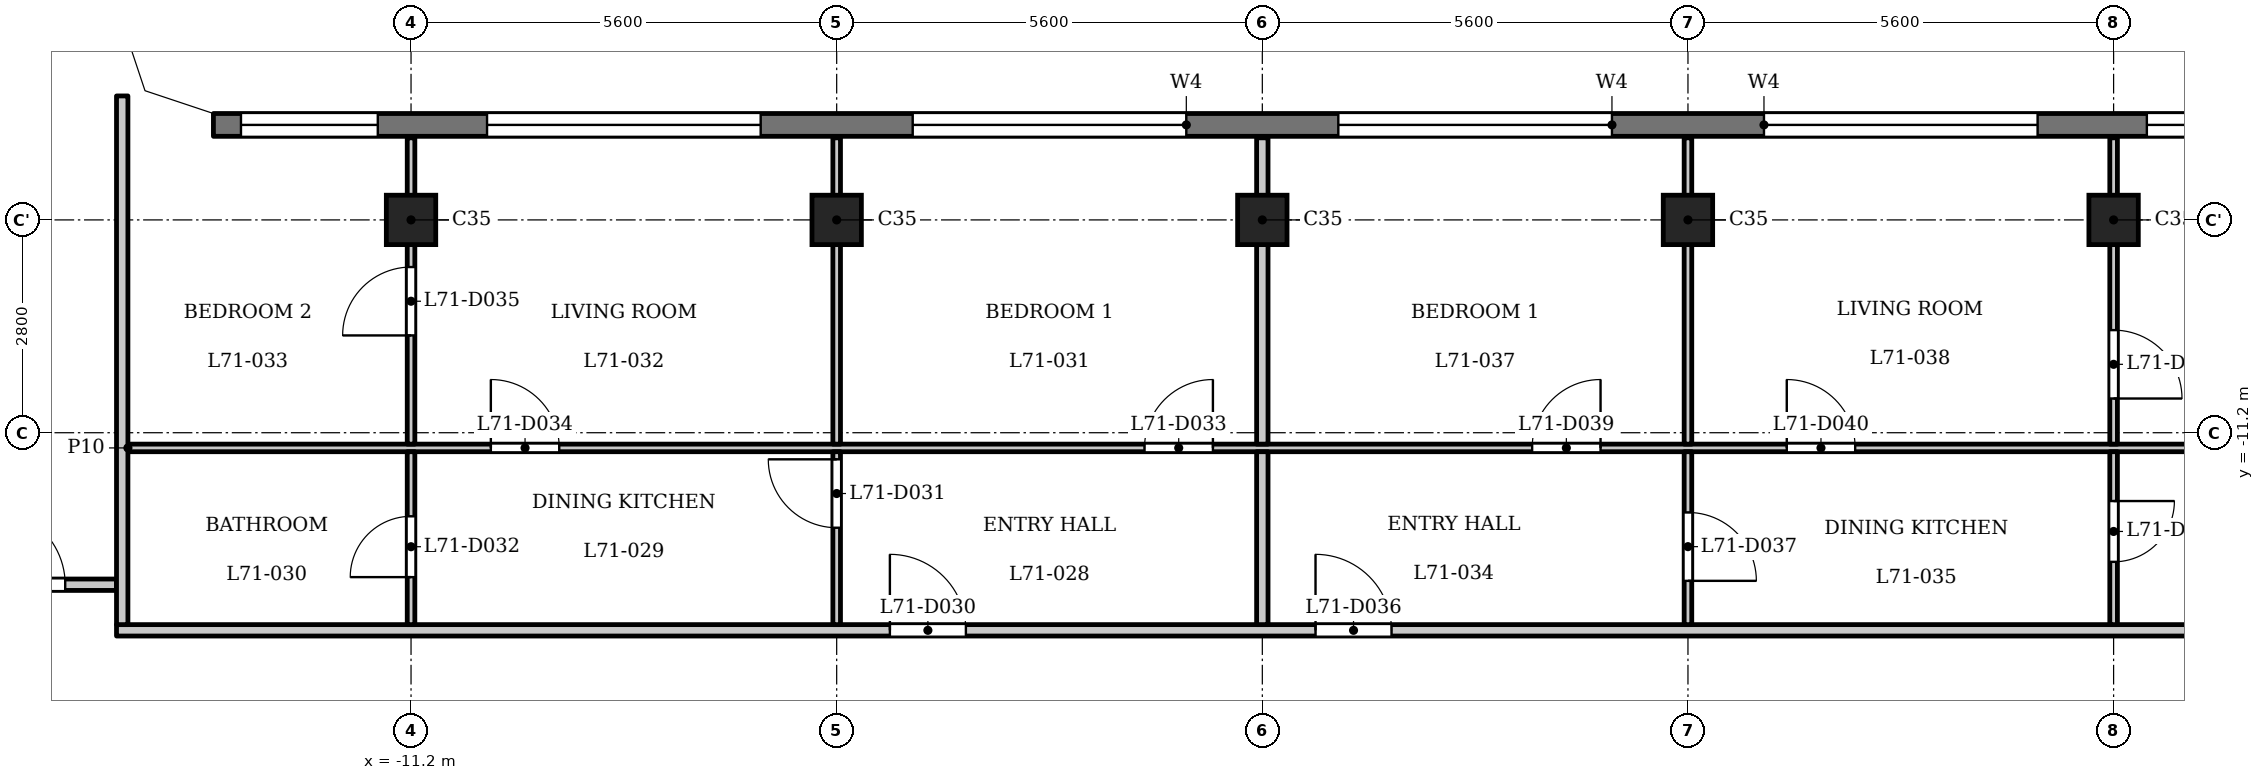
"""IFC4 building model, lengths in metres.
Left out: names, types, materials, properties, quantities, classifications, styles, units other than length and angle.
Written with IfcOpenShell. Run it as: python <this file> out.ifc"""

import sys

from ifc_helpers import new_model, si_unit, direction, frame, frame_2d, origin, origin_2d, place, context, subcontext, project, spatial, polyline, rectangle, outline, extrude, element, fill, save


model = new_model("IFC4")
c1 = context("Model", 3, precision=1e-05, world=origin(), true_north=direction((0.0, 1.0)))
c2 = subcontext(c1, "Body", "Model", "MODEL_VIEW")
j1 = project(units=[si_unit("LENGTHUNIT", "METRE"), si_unit("PLANEANGLEUNIT", "RADIAN")], contexts=[c1])
p1 = place(None, origin())
s1 = spatial("IfcSite", under=j1, at=p1, CompositionType="ELEMENT")
p2 = place(p1, origin())
s2 = spatial("IfcBuilding", under=s1, at=p2, CompositionType="ELEMENT")
p3 = place(p2, frame((0.0, 0.0, 273.2)))
s3 = spatial("IfcBuildingStorey", under=s2, at=p3, CompositionType="ELEMENT", Elevation=273.2)
for number, where, z_axis, x_axis in (
    (1, (-11.2, -8.4, 0.0), (0.0, 0.0, 1.0), (1.0, 0.0, 0.0)),
    (2, (-5.6, -8.4, 0.0), (0.0, 0.0, 1.0), (1.0, 0.0, 0.0)),
    (3, (0.0, -8.4, 0.0), (0.0, 0.0, 1.0), (1.0, 0.0, 0.0)),
    (4, (5.6, -8.4, 0.0), (0.0, 0.0, 1.0), (1.0, 0.0, 0.0)),
    (5, (11.2, -8.4, 0.0), (0.0, 0.0, 1.0), (1.0, 0.0, 0.0)),
):
    element("IfcColumn", number, at=place(p3, frame(where, z_axis=z_axis, x_axis=x_axis)), inside=s3, PredefinedType="COLUMN", context=c2, shape_type="SweptSolid", body=[
        extrude(rectangle(XDim=0.65, YDim=0.65, at=origin_2d()), origin(), (0.0, 0.0, 1.0), 3.5),
    ])
p4 = place(p3, frame((13.8, -7.15, 0.0), z_axis=(0.0, 0.0, 1.0), x_axis=(-1.0, 0.0, 0.0)))
e6 = element("IfcWall", 6, at=p4, inside=s3, PredefinedType="SOLIDWALL", context=c2, shape_type="SweptSolid", body=[
    extrude(rectangle(XDim=27.6, YDim=0.3, at=frame_2d((13.8, 0.0))), origin(), (0.0, 0.0, 1.0), 3.2),
])
p5 = place(p4, frame((0.363, 0.0, 0.9)))
e7 = element("IfcOpeningElement", 7, at=p5, cuts=e6, PredefinedType="OPENING", context=c2, shape_type="SweptSolid", body=[
    extrude(rectangle(XDim=1.8, YDim=1.25, at=frame_2d((0.9, 0.625))), frame((0.0, 0.16, 0.0), z_axis=(0.0, -1.0, 0.0), x_axis=(1.0, 0.0, 0.0)), (0.0, 0.0, 1.0), 0.32),
])
p6 = place(p4, frame((3.6, 0.0, 1.2)))
e8 = element("IfcOpeningElement", 8, at=p6, cuts=e6, PredefinedType="OPENING", context=c2, shape_type="SweptSolid", body=[
    extrude(rectangle(XDim=3.6, YDim=0.95, at=frame_2d((1.8, 0.475))), frame((0.0, 0.16, 0.0), z_axis=(0.0, -1.0, 0.0), x_axis=(1.0, 0.0, 0.0)), (0.0, 0.0, 1.0), 0.32),
])
p7 = place(p4, frame((9.2, 0.0, 1.2)))
e9 = element("IfcOpeningElement", 9, at=p7, cuts=e6, PredefinedType="OPENING", context=c2, shape_type="SweptSolid", body=[
    extrude(rectangle(XDim=3.6, YDim=0.95, at=frame_2d((1.8, 0.475))), frame((0.0, 0.16, 0.0), z_axis=(0.0, -1.0, 0.0), x_axis=(1.0, 0.0, 0.0)), (0.0, 0.0, 1.0), 0.32),
])
p8 = place(p4, frame((14.8, 0.0, 1.2)))
e10 = element("IfcOpeningElement", 10, at=p8, cuts=e6, PredefinedType="OPENING", context=c2, shape_type="SweptSolid", body=[
    extrude(rectangle(XDim=3.6, YDim=0.95, at=frame_2d((1.8, 0.475))), frame((0.0, 0.16, 0.0), z_axis=(0.0, -1.0, 0.0), x_axis=(1.0, 0.0, 0.0)), (0.0, 0.0, 1.0), 0.32),
])
p9 = place(p4, frame((20.4, 0.0, 1.2)))
e11 = element("IfcOpeningElement", 11, at=p9, cuts=e6, PredefinedType="OPENING", context=c2, shape_type="SweptSolid", body=[
    extrude(rectangle(XDim=3.6, YDim=0.95, at=frame_2d((1.8, 0.475))), frame((0.0, 0.16, 0.0), z_axis=(0.0, -1.0, 0.0), x_axis=(1.0, 0.0, 0.0)), (0.0, 0.0, 1.0), 0.32),
])
p10 = place(p4, frame((25.438, 0.0, 0.9)))
e12 = element("IfcOpeningElement", 12, at=p10, cuts=e6, PredefinedType="OPENING", context=c2, shape_type="SweptSolid", body=[
    extrude(rectangle(XDim=1.8, YDim=1.25, at=frame_2d((0.9, 0.625))), frame((0.0, 0.16, 0.0), z_axis=(0.0, -1.0, 0.0), x_axis=(1.0, 0.0, 0.0)), (0.0, 0.0, 1.0), 0.32),
])
p11 = place(p3, frame((-15.075, -13.8, 0.0), z_axis=(0.0, 0.0, 1.0), x_axis=(1.0, 0.0, 0.0)))
e13 = element("IfcWall", 13, at=p11, inside=s3, PredefinedType="PARTITIONING", context=c2, shape_type="SweptSolid", body=[
    extrude(rectangle(XDim=30.15, YDim=0.15, at=frame_2d((15.075, 0.0))), origin(), (0.0, 0.0, 1.0), 3.2),
])
p12 = place(p11, frame((10.175, 0.0, 0.0)))
e14 = element("IfcOpeningElement", 14, at=p12, cuts=e13, PredefinedType="OPENING", context=c2, shape_type="SweptSolid", body=[
    extrude(rectangle(XDim=1.0, YDim=2.1, at=frame_2d((0.5, 1.05))), frame((0.0, 0.085, 0.0), z_axis=(0.0, -1.0, 0.0), x_axis=(1.0, 0.0, 0.0)), (0.0, 0.0, 1.0), 0.17),
])
p13 = place(p11, frame((15.775, 0.0, 0.0)))
e15 = element("IfcOpeningElement", 15, at=p13, cuts=e13, PredefinedType="OPENING", context=c2, shape_type="SweptSolid", body=[
    extrude(rectangle(XDim=1.0, YDim=2.1, at=frame_2d((0.5, 1.05))), frame((0.0, 0.085, 0.0), z_axis=(0.0, -1.0, 0.0), x_axis=(1.0, 0.0, 0.0)), (0.0, 0.0, 1.0), 0.17),
])
p14 = place(p3, frame((-17.4, -13.2, 0.0), z_axis=(0.0, 0.0, 1.0), x_axis=(1.0, 0.0, 0.0)))
e16 = element("IfcWall", 16, at=p14, inside=s3, PredefinedType="PARTITIONING", context=c2, shape_type="SweptSolid", body=[
    extrude(rectangle(XDim=2.325, YDim=0.15, at=frame_2d((1.163, 0.0))), origin(), (0.0, 0.0, 1.0), 3.2),
])
p15 = place(p14, frame((0.65, 0.0, 0.0)))
e17 = element("IfcOpeningElement", 17, at=p15, cuts=e16, PredefinedType="OPENING", context=c2, shape_type="SweptSolid", body=[
    extrude(rectangle(XDim=1.0, YDim=2.1, at=frame_2d((0.5, 1.05))), frame((0.0, 0.085, 0.0), z_axis=(0.0, -1.0, 0.0), x_axis=(1.0, 0.0, 0.0)), (0.0, 0.0, 1.0), 0.17),
])
p16 = place(p3, frame((-14.925, -11.4, 0.0), z_axis=(0.0, 0.0, 1.0), x_axis=(1.0, 0.0, 0.0)))
e18 = element("IfcWall", 18, at=p16, inside=s3, PredefinedType="PARTITIONING", context=c2, shape_type="SweptSolid", body=[
    extrude(rectangle(XDim=29.85, YDim=0.1, at=frame_2d((14.925, 0.0))), origin(), (0.0, 0.0, 1.0), 3.2),
])
p17 = place(p16, frame((13.375, 0.0, 0.0)))
e19 = element("IfcOpeningElement", 19, at=p17, cuts=e18, PredefinedType="OPENING", context=c2, shape_type="SweptSolid", body=[
    extrude(rectangle(XDim=0.9, YDim=2.1, at=frame_2d((0.45, 1.05))), frame((0.0, 0.06, 0.0), z_axis=(0.0, -1.0, 0.0), x_axis=(1.0, 0.0, 0.0)), (0.0, 0.0, 1.0), 0.12),
])
p18 = place(p16, frame((4.775, 0.0, 0.0)))
e20 = element("IfcOpeningElement", 20, at=p18, cuts=e18, PredefinedType="OPENING", context=c2, shape_type="SweptSolid", body=[
    extrude(rectangle(XDim=0.9, YDim=2.1, at=frame_2d((0.45, 1.05))), frame((0.0, 0.06, 0.0), z_axis=(0.0, -1.0, 0.0), x_axis=(1.0, 0.0, 0.0)), (0.0, 0.0, 1.0), 0.12),
])
p19 = place(p16, frame((18.475, 0.0, 0.0)))
e21 = element("IfcOpeningElement", 21, at=p19, cuts=e18, PredefinedType="OPENING", context=c2, shape_type="SweptSolid", body=[
    extrude(rectangle(XDim=0.9, YDim=2.1, at=frame_2d((0.45, 1.05))), frame((0.0, 0.06, 0.0), z_axis=(0.0, -1.0, 0.0), x_axis=(1.0, 0.0, 0.0)), (0.0, 0.0, 1.0), 0.12),
])
p20 = place(p16, frame((21.825, 0.0, 0.0)))
e22 = element("IfcOpeningElement", 22, at=p20, cuts=e18, PredefinedType="OPENING", context=c2, shape_type="SweptSolid", body=[
    extrude(rectangle(XDim=0.9, YDim=2.1, at=frame_2d((0.45, 1.05))), frame((0.0, 0.06, 0.0), z_axis=(0.0, -1.0, 0.0), x_axis=(1.0, 0.0, 0.0)), (0.0, 0.0, 1.0), 0.12),
])
p21 = place(p3, frame((-15.0, -13.725, 0.0), z_axis=(0.0, 0.0, 1.0), x_axis=(0.0, 1.0, 0.0)))
e23 = element("IfcWall", 23, at=p21, inside=s3, PredefinedType="PARTITIONING", context=c2, shape_type="SweptSolid", body=[
    extrude(rectangle(XDim=6.956, YDim=0.15, at=frame_2d((3.478, 0.0))), origin(), (0.0, 0.0, 1.0), 3.2),
])
p22 = place(p3, frame((-11.2, -13.725, 0.0), z_axis=(0.0, 0.0, 1.0), x_axis=(0.0, 1.0, 0.0)))
e24 = element("IfcWall", 24, at=p22, inside=s3, PredefinedType="PARTITIONING", context=c2, shape_type="SweptSolid", body=[
    extrude(rectangle(XDim=2.275, YDim=0.1, at=frame_2d((1.138, 0.0))), origin(), (0.0, 0.0, 1.0), 3.2),
])
p23 = place(p22, frame((0.625, 0.0, 0.0)))
e25 = element("IfcOpeningElement", 25, at=p23, cuts=e24, PredefinedType="OPENING", context=c2, shape_type="SweptSolid", body=[
    extrude(rectangle(XDim=0.8, YDim=2.1, at=frame_2d((0.4, 1.05))), frame((0.0, 0.06, 0.0), z_axis=(0.0, -1.0, 0.0), x_axis=(1.0, 0.0, 0.0)), (0.0, 0.0, 1.0), 0.12),
])
p24 = place(p3, frame((-11.2, -11.35, 0.0), z_axis=(0.0, 0.0, 1.0), x_axis=(0.0, 1.0, 0.0)))
e26 = element("IfcWall", 26, at=p24, inside=s3, PredefinedType="PARTITIONING", context=c2, shape_type="SweptSolid", body=[
    extrude(rectangle(XDim=4.03, YDim=0.1, at=frame_2d((2.015, 0.0))), origin(), (0.0, 0.0, 1.0), 3.2),
])
p25 = place(p24, frame((1.43, 0.0, 0.0)))
e27 = element("IfcOpeningElement", 27, at=p25, cuts=e26, PredefinedType="OPENING", context=c2, shape_type="SweptSolid", body=[
    extrude(rectangle(XDim=0.9, YDim=2.1, at=frame_2d((0.45, 1.05))), frame((0.0, 0.06, 0.0), z_axis=(0.0, -1.0, 0.0), x_axis=(1.0, 0.0, 0.0)), (0.0, 0.0, 1.0), 0.12),
])
p26 = place(p3, frame((-5.6, -13.725, 0.0), z_axis=(0.0, 0.0, 1.0), x_axis=(0.0, 1.0, 0.0)))
e28 = element("IfcWall", 28, at=p26, inside=s3, PredefinedType="PARTITIONING", context=c2, shape_type="SweptSolid", body=[
    extrude(rectangle(XDim=2.275, YDim=0.1, at=frame_2d((1.138, 0.0))), origin(), (0.0, 0.0, 1.0), 3.2),
])
p27 = place(p26, frame((1.275, 0.0, 0.0)))
e29 = element("IfcOpeningElement", 29, at=p27, cuts=e28, PredefinedType="OPENING", context=c2, shape_type="SweptSolid", body=[
    extrude(rectangle(XDim=0.9, YDim=2.1, at=frame_2d((0.45, 1.05))), frame((0.0, 0.06, 0.0), z_axis=(0.0, -1.0, 0.0), x_axis=(1.0, 0.0, 0.0)), (0.0, 0.0, 1.0), 0.12),
])
p28 = place(p3, frame((-5.6, -11.35, 0.0), z_axis=(0.0, 0.0, 1.0), x_axis=(0.0, 1.0, 0.0)))
e30 = element("IfcWall", 30, at=p28, inside=s3, PredefinedType="PARTITIONING", context=c2, shape_type="SweptSolid", body=[
    extrude(rectangle(XDim=4.03, YDim=0.1, at=frame_2d((2.015, 0.0))), origin(), (0.0, 0.0, 1.0), 3.2),
])
p29 = place(p3, frame((0.0, -13.725, 0.0), z_axis=(0.0, 0.0, 1.0), x_axis=(0.0, 1.0, 0.0)))
e31 = element("IfcWall", 31, at=p29, inside=s3, PredefinedType="PARTITIONING", context=c2, shape_type="SweptSolid", body=[
    extrude(rectangle(XDim=2.275, YDim=0.15, at=frame_2d((1.138, 0.0))), origin(), (0.0, 0.0, 1.0), 3.2),
])
p30 = place(p3, frame((0.0, -11.35, 0.0), z_axis=(0.0, 0.0, 1.0), x_axis=(0.0, 1.0, 0.0)))
e32 = element("IfcWall", 32, at=p30, inside=s3, PredefinedType="PARTITIONING", context=c2, shape_type="SweptSolid", body=[
    extrude(rectangle(XDim=4.03, YDim=0.15, at=frame_2d((2.015, 0.0))), origin(), (0.0, 0.0, 1.0), 3.2),
])
p31 = place(p3, frame((5.6, -13.725, 0.0), z_axis=(0.0, 0.0, 1.0), x_axis=(0.0, 1.0, 0.0)))
e33 = element("IfcWall", 33, at=p31, inside=s3, PredefinedType="PARTITIONING", context=c2, shape_type="SweptSolid", body=[
    extrude(rectangle(XDim=2.275, YDim=0.1, at=frame_2d((1.138, 0.0))), origin(), (0.0, 0.0, 1.0), 3.2),
])
p32 = place(p31, frame((0.576, 0.0, 0.0)))
e34 = element("IfcOpeningElement", 34, at=p32, cuts=e33, PredefinedType="OPENING", context=c2, shape_type="SweptSolid", body=[
    extrude(rectangle(XDim=0.9, YDim=2.1, at=frame_2d((0.45, 1.05))), frame((0.0, 0.06, 0.0), z_axis=(0.0, -1.0, 0.0), x_axis=(1.0, 0.0, 0.0)), (0.0, 0.0, 1.0), 0.12),
])
p33 = place(p3, frame((5.6, -11.35, 0.0), z_axis=(0.0, 0.0, 1.0), x_axis=(0.0, 1.0, 0.0)))
e35 = element("IfcWall", 35, at=p33, inside=s3, PredefinedType="PARTITIONING", context=c2, shape_type="SweptSolid", body=[
    extrude(rectangle(XDim=4.03, YDim=0.1, at=frame_2d((2.015, 0.0))), origin(), (0.0, 0.0, 1.0), 3.2),
])
p34 = place(p3, frame((11.2, -13.725, 0.0), z_axis=(0.0, 0.0, 1.0), x_axis=(0.0, 1.0, 0.0)))
e36 = element("IfcWall", 36, at=p34, inside=s3, PredefinedType="PARTITIONING", context=c2, shape_type="SweptSolid", body=[
    extrude(rectangle(XDim=2.275, YDim=0.1, at=frame_2d((1.138, 0.0))), origin(), (0.0, 0.0, 1.0), 3.2),
])
p35 = place(p34, frame((0.826, 0.0, 0.0)))
e37 = element("IfcOpeningElement", 37, at=p35, cuts=e36, PredefinedType="OPENING", context=c2, shape_type="SweptSolid", body=[
    extrude(rectangle(XDim=0.8, YDim=2.1, at=frame_2d((0.4, 1.05))), frame((0.0, 0.06, 0.0), z_axis=(0.0, -1.0, 0.0), x_axis=(1.0, 0.0, 0.0)), (0.0, 0.0, 1.0), 0.12),
])
p36 = place(p3, frame((11.2, -11.35, 0.0), z_axis=(0.0, 0.0, 1.0), x_axis=(0.0, 1.0, 0.0)))
e38 = element("IfcWall", 38, at=p36, inside=s3, PredefinedType="PARTITIONING", context=c2, shape_type="SweptSolid", body=[
    extrude(rectangle(XDim=4.03, YDim=0.1, at=frame_2d((2.015, 0.0))), origin(), (0.0, 0.0, 1.0), 3.2),
])
p37 = place(p36, frame((0.6, 0.0, 0.0)))
e39 = element("IfcOpeningElement", 39, at=p37, cuts=e38, PredefinedType="OPENING", context=c2, shape_type="SweptSolid", body=[
    extrude(rectangle(XDim=0.9, YDim=2.1, at=frame_2d((0.45, 1.05))), frame((0.0, 0.06, 0.0), z_axis=(0.0, -1.0, 0.0), x_axis=(1.0, 0.0, 0.0)), (0.0, 0.0, 1.0), 0.12),
])
p38 = place(p3, origin())
e40 = element("IfcWall", 40, at=p38, inside=s3, PredefinedType="SOLIDWALL", context=c2, shape_type="SweptSolid", body=[
    extrude(outline(polyline([(-14.937, -6.937), (-13.849, -7.3), (-13.8, -7.3), (-13.8, -7.0), (-14.7, -6.7), (-15.0, -5.8), (-15.3, -5.8), (-15.3, -5.849), (-14.937, -6.937)])), origin(), (0.0, 0.0, 1.0), 3.2),
])
p39 = place(p15, origin())
e41 = element("IfcDoor", 41, at=p39, inside=s3, OperationType="SINGLE_SWING_RIGHT", PredefinedType="DOOR", context=c2, shape_type="SweptSolid", body=[
    extrude(rectangle(XDim=1.0, YDim=2.1, at=frame_2d((0.5, 1.05))), frame((0.0, 0.025, 0.0), z_axis=(0.0, -1.0, 0.0), x_axis=(1.0, 0.0, 0.0)), (0.0, 0.0, 1.0), 0.05),
])
fill(e17, e41)
p40 = place(p12, origin())
e42 = element("IfcDoor", 42, at=p40, inside=s3, OperationType="SINGLE_SWING_RIGHT", PredefinedType="DOOR", context=c2, shape_type="SweptSolid", body=[
    extrude(rectangle(XDim=1.0, YDim=2.1, at=frame_2d((0.5, 1.05))), frame((0.0, 0.025, 0.0), z_axis=(0.0, -1.0, 0.0), x_axis=(1.0, 0.0, 0.0)), (0.0, 0.0, 1.0), 0.05),
])
fill(e14, e42)
p41 = place(p27, origin())
e43 = element("IfcDoor", 43, at=p41, inside=s3, OperationType="SINGLE_SWING_LEFT", PredefinedType="DOOR", context=c2, shape_type="SweptSolid", body=[
    extrude(rectangle(XDim=0.9, YDim=2.1, at=frame_2d((0.45, 1.05))), frame((0.0, 0.025, 0.0), z_axis=(0.0, -1.0, 0.0), x_axis=(1.0, 0.0, 0.0)), (0.0, 0.0, 1.0), 0.05),
])
fill(e29, e43)
p42 = place(p23, origin())
e44 = element("IfcDoor", 44, at=p42, inside=s3, OperationType="SINGLE_SWING_RIGHT", PredefinedType="DOOR", context=c2, shape_type="SweptSolid", body=[
    extrude(rectangle(XDim=0.8, YDim=2.1, at=frame_2d((0.4, 1.05))), frame((0.0, 0.025, 0.0), z_axis=(0.0, -1.0, 0.0), x_axis=(1.0, 0.0, 0.0)), (0.0, 0.0, 1.0), 0.05),
])
fill(e25, e44)
p43 = place(p17, origin())
e45 = element("IfcDoor", 45, at=p43, inside=s3, OperationType="SINGLE_SWING_LEFT", PredefinedType="DOOR", context=c2, shape_type="SweptSolid", body=[
    extrude(rectangle(XDim=0.9, YDim=2.1, at=frame_2d((0.45, 1.05))), frame((0.0, 0.025, 0.0), z_axis=(0.0, -1.0, 0.0), x_axis=(1.0, 0.0, 0.0)), (0.0, 0.0, 1.0), 0.05),
])
fill(e19, e45)
p44 = place(p18, origin())
e46 = element("IfcDoor", 46, at=p44, inside=s3, OperationType="SINGLE_SWING_RIGHT", PredefinedType="DOOR", context=c2, shape_type="SweptSolid", body=[
    extrude(rectangle(XDim=0.9, YDim=2.1, at=frame_2d((0.45, 1.05))), frame((0.0, 0.025, 0.0), z_axis=(0.0, -1.0, 0.0), x_axis=(1.0, 0.0, 0.0)), (0.0, 0.0, 1.0), 0.05),
])
fill(e20, e46)
p45 = place(p25, origin())
e47 = element("IfcDoor", 47, at=p45, inside=s3, OperationType="SINGLE_SWING_RIGHT", PredefinedType="DOOR", context=c2, shape_type="SweptSolid", body=[
    extrude(rectangle(XDim=0.9, YDim=2.1, at=frame_2d((0.45, 1.05))), frame((0.0, 0.025, 0.0), z_axis=(0.0, -1.0, 0.0), x_axis=(1.0, 0.0, 0.0)), (0.0, 0.0, 1.0), 0.05),
])
fill(e27, e47)
p46 = place(p13, origin())
e48 = element("IfcDoor", 48, at=p46, inside=s3, OperationType="SINGLE_SWING_RIGHT", PredefinedType="DOOR", context=c2, shape_type="SweptSolid", body=[
    extrude(rectangle(XDim=1.0, YDim=2.1, at=frame_2d((0.5, 1.05))), frame((0.0, 0.025, 0.0), z_axis=(0.0, -1.0, 0.0), x_axis=(1.0, 0.0, 0.0)), (0.0, 0.0, 1.0), 0.05),
])
fill(e15, e48)
p47 = place(p32, origin())
e49 = element("IfcDoor", 49, at=p47, inside=s3, OperationType="SINGLE_SWING_LEFT", PredefinedType="DOOR", context=c2, shape_type="SweptSolid", body=[
    extrude(rectangle(XDim=0.9, YDim=2.1, at=frame_2d((0.45, 1.05))), frame((0.0, 0.025, 0.0), z_axis=(0.0, -1.0, 0.0), x_axis=(1.0, 0.0, 0.0)), (0.0, 0.0, 1.0), 0.05),
])
fill(e34, e49)
p48 = place(p35, origin())
e50 = element("IfcDoor", 50, at=p48, inside=s3, OperationType="SINGLE_SWING_RIGHT", PredefinedType="DOOR", context=c2, shape_type="SweptSolid", body=[
    extrude(rectangle(XDim=0.8, YDim=2.1, at=frame_2d((0.4, 1.05))), frame((0.0, 0.025, 0.0), z_axis=(0.0, -1.0, 0.0), x_axis=(1.0, 0.0, 0.0)), (0.0, 0.0, 1.0), 0.05),
])
fill(e37, e50)
p49 = place(p19, origin())
e51 = element("IfcDoor", 51, at=p49, inside=s3, OperationType="SINGLE_SWING_LEFT", PredefinedType="DOOR", context=c2, shape_type="SweptSolid", body=[
    extrude(rectangle(XDim=0.9, YDim=2.1, at=frame_2d((0.45, 1.05))), frame((0.0, 0.025, 0.0), z_axis=(0.0, -1.0, 0.0), x_axis=(1.0, 0.0, 0.0)), (0.0, 0.0, 1.0), 0.05),
])
fill(e21, e51)
p50 = place(p20, origin())
e52 = element("IfcDoor", 52, at=p50, inside=s3, OperationType="SINGLE_SWING_RIGHT", PredefinedType="DOOR", context=c2, shape_type="SweptSolid", body=[
    extrude(rectangle(XDim=0.9, YDim=2.1, at=frame_2d((0.45, 1.05))), frame((0.0, 0.025, 0.0), z_axis=(0.0, -1.0, 0.0), x_axis=(1.0, 0.0, 0.0)), (0.0, 0.0, 1.0), 0.05),
])
fill(e22, e52)
p51 = place(p37, origin())
e53 = element("IfcDoor", 53, at=p51, inside=s3, OperationType="SINGLE_SWING_LEFT", PredefinedType="DOOR", context=c2, shape_type="SweptSolid", body=[
    extrude(rectangle(XDim=0.9, YDim=2.1, at=frame_2d((0.45, 1.05))), frame((0.0, 0.025, 0.0), z_axis=(0.0, -1.0, 0.0), x_axis=(1.0, 0.0, 0.0)), (0.0, 0.0, 1.0), 0.05),
])
fill(e39, e53)
p52 = place(p5, origin())
e54 = element("IfcWindow", 54, at=p52, inside=s3, PartitioningType="SINGLE_PANEL", PredefinedType="WINDOW", context=c2, shape_type="SweptSolid", body=[
    extrude(rectangle(XDim=1.8, YDim=1.25, at=frame_2d((0.9, 0.625))), frame((0.0, 0.03, 0.0), z_axis=(0.0, -1.0, 0.0), x_axis=(1.0, 0.0, 0.0)), (0.0, 0.0, 1.0), 0.06),
])
fill(e7, e54)
p53 = place(p6, origin())
e55 = element("IfcWindow", 55, at=p53, inside=s3, PartitioningType="SINGLE_PANEL", PredefinedType="WINDOW", context=c2, shape_type="SweptSolid", body=[
    extrude(rectangle(XDim=3.6, YDim=0.95, at=frame_2d((1.8, 0.475))), frame((0.0, 0.03, 0.0), z_axis=(0.0, -1.0, 0.0), x_axis=(1.0, 0.0, 0.0)), (0.0, 0.0, 1.0), 0.06),
])
fill(e8, e55)
p54 = place(p7, origin())
e56 = element("IfcWindow", 56, at=p54, inside=s3, PartitioningType="SINGLE_PANEL", PredefinedType="WINDOW", context=c2, shape_type="SweptSolid", body=[
    extrude(rectangle(XDim=3.6, YDim=0.95, at=frame_2d((1.8, 0.475))), frame((0.0, 0.03, 0.0), z_axis=(0.0, -1.0, 0.0), x_axis=(1.0, 0.0, 0.0)), (0.0, 0.0, 1.0), 0.06),
])
fill(e9, e56)
p55 = place(p8, origin())
e57 = element("IfcWindow", 57, at=p55, inside=s3, PartitioningType="SINGLE_PANEL", PredefinedType="WINDOW", context=c2, shape_type="SweptSolid", body=[
    extrude(rectangle(XDim=3.6, YDim=0.95, at=frame_2d((1.8, 0.475))), frame((0.0, 0.03, 0.0), z_axis=(0.0, -1.0, 0.0), x_axis=(1.0, 0.0, 0.0)), (0.0, 0.0, 1.0), 0.06),
])
fill(e10, e57)
p56 = place(p9, origin())
e58 = element("IfcWindow", 58, at=p56, inside=s3, PartitioningType="SINGLE_PANEL", PredefinedType="WINDOW", context=c2, shape_type="SweptSolid", body=[
    extrude(rectangle(XDim=3.6, YDim=0.95, at=frame_2d((1.8, 0.475))), frame((0.0, 0.03, 0.0), z_axis=(0.0, -1.0, 0.0), x_axis=(1.0, 0.0, 0.0)), (0.0, 0.0, 1.0), 0.06),
])
fill(e11, e58)
p57 = place(p10, origin())
e59 = element("IfcWindow", 59, at=p57, inside=s3, PartitioningType="SINGLE_PANEL", PredefinedType="WINDOW", context=c2, shape_type="SweptSolid", body=[
    extrude(rectangle(XDim=1.8, YDim=1.25, at=frame_2d((0.9, 0.625))), frame((0.0, 0.03, 0.0), z_axis=(0.0, -1.0, 0.0), x_axis=(1.0, 0.0, 0.0)), (0.0, 0.0, 1.0), 0.06),
])
fill(e12, e59)
save(model, sys.argv[1])
